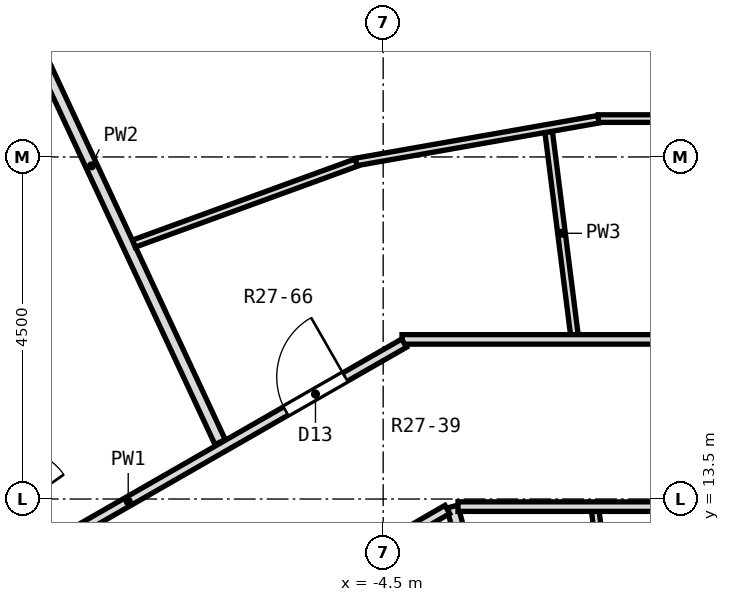
"""IFC4 building model, lengths in metres.
Left out: names, types, materials, properties, quantities, classifications, styles, units other than length and angle.
Written with IfcOpenShell. Run it as: python <this file> out.ifc"""

import sys

from ifc_helpers import new_model, si_unit, direction, frame, frame_2d, origin, place, context, subcontext, project, spatial, rectangle, extrude, element, fill, save


model = new_model("IFC4")
c1 = context("Model", 3, precision=1e-05, world=origin(), true_north=direction((0.0, 1.0)))
c2 = subcontext(c1, "Body", "Model", "MODEL_VIEW")
j1 = project(units=[si_unit("LENGTHUNIT", "METRE"), si_unit("PLANEANGLEUNIT", "RADIAN")], contexts=[c1])
p1 = place(None, origin())
s1 = spatial("IfcSite", under=j1, at=p1, CompositionType="ELEMENT")
p2 = place(p1, origin())
s2 = spatial("IfcBuilding", under=s1, at=p2, CompositionType="ELEMENT")
p3 = place(p2, frame((0.0, 0.0, 180.6)))
s3 = spatial("IfcBuildingStorey", under=s2, at=p3, CompositionType="ELEMENT", Elevation=180.6)
p4 = place(p3, frame((-2.323, 18.33, 0.0), z_axis=(0.0, 0.0, 1.0), x_axis=(0.125632208846, -0.992076886184, 0.0)))
e1 = element("IfcWall", 1, at=p4, inside=s3, PredefinedType="PARTITIONING", context=c2, shape_type="SweptSolid", body=[
    extrude(rectangle(XDim=2.689, YDim=0.1, at=frame_2d((1.345, 0.0))), origin(), (0.0, 0.0, 1.0), 2.85),
])
p5 = place(p3, frame((-1.709, 13.338, 0.0), z_axis=(0.0, 0.0, 1.0), x_axis=(0.126956267131, -0.991908315439, 0.0)))
e2 = element("IfcWall", 2, at=p5, inside=s3, PredefinedType="PARTITIONING", context=c2, shape_type="SweptSolid", body=[
    extrude(rectangle(XDim=1.954, YDim=0.1, at=frame_2d((0.977, 0.0))), origin(), (0.0, 0.0, 1.0), 2.85),
])
p6 = place(p5, frame((0.546, 0.0, 0.0)))
e3 = element("IfcOpeningElement", 3, at=p6, cuts=e2, PredefinedType="OPENING", context=c2, shape_type="SweptSolid", body=[
    extrude(rectangle(XDim=0.8, YDim=2.1, at=frame_2d((0.4, 1.05))), frame((0.0, 0.062, 0.0), z_axis=(0.0, -1.0, 0.0), x_axis=(1.0, 0.0, 0.0)), (0.0, 0.0, 1.0), 0.124),
])
p7 = place(p3, frame((-3.591, 13.4, 0.0), z_axis=(0.0, 0.0, 1.0), x_axis=(0.25888001656, -0.965909486974, 0.0)))
e4 = element("IfcWall", 4, at=p7, inside=s3, PredefinedType="PARTITIONING", context=c2, shape_type="SweptSolid", body=[
    extrude(rectangle(XDim=4.381, YDim=0.15, at=frame_2d((2.19, 0.0))), origin(), (0.0, 0.0, 1.0), 2.85),
])
p8 = place(p3, frame((-10.031, 21.517, 0.0), z_axis=(0.0, 0.0, 1.0), x_axis=(0.422305280768, -0.906453666679, 0.0)))
e5 = element("IfcWall", 5, at=p8, inside=s3, PredefinedType="PARTITIONING", context=c2, shape_type="SweptSolid", body=[
    extrude(rectangle(XDim=8.018, YDim=0.15, at=frame_2d((4.009, 0.0))), origin(), (0.0, 0.0, 1.0), 2.85),
])
p9 = place(p3, frame((-3.516, 13.4, 0.0), z_axis=(0.0, 0.0, 1.0), x_axis=(1.0, 0.0, 0.0)))
e6 = element("IfcWall", 6, at=p9, inside=s3, PredefinedType="PARTITIONING", context=c2, shape_type="SweptSolid", body=[
    extrude(rectangle(XDim=7.045, YDim=0.125, at=frame_2d((3.522, 0.0))), origin(), (0.0, 0.0, 1.0), 2.85),
])
p10 = place(p9, frame((3.067, 0.0, 0.0)))
e7 = element("IfcOpeningElement", 7, at=p10, cuts=e6, PredefinedType="OPENING", context=c2, shape_type="SweptSolid", body=[
    extrude(rectangle(XDim=1.0, YDim=2.1, at=frame_2d((0.5, 1.05))), frame((0.0, 0.074, 0.0), z_axis=(0.0, -1.0, 0.0), x_axis=(1.0, 0.0, 0.0)), (0.0, 0.0, 1.0), 0.149),
])
p11 = place(p3, frame((-4.252, 15.6, 0.0), z_axis=(0.0, 0.0, 1.0), x_axis=(1.0, 0.0, 0.0)))
e8 = element("IfcWall", 8, at=p11, inside=s3, PredefinedType="PARTITIONING", context=c2, shape_type="SweptSolid", body=[
    extrude(rectangle(XDim=8.369, YDim=0.125, at=frame_2d((4.185, 0.0))), origin(), (0.0, 0.0, 1.0), 2.85),
])
p12 = place(p11, frame((6.578, 0.0, 0.0)))
e9 = element("IfcOpeningElement", 9, at=p12, cuts=e8, PredefinedType="OPENING", context=c2, shape_type="SweptSolid", body=[
    extrude(rectangle(XDim=1.0, YDim=2.1, at=frame_2d((0.5, 1.05))), frame((0.0, 0.074, 0.0), z_axis=(0.0, -1.0, 0.0), x_axis=(1.0, 0.0, 0.0)), (0.0, 0.0, 1.0), 0.149),
])
p13 = place(p11, frame((3.55, 0.0, 0.0)))
e10 = element("IfcOpeningElement", 10, at=p13, cuts=e8, PredefinedType="OPENING", context=c2, shape_type="SweptSolid", body=[
    extrude(rectangle(XDim=0.9, YDim=2.1, at=frame_2d((0.45, 1.05))), frame((0.0, 0.074, 0.0), z_axis=(0.0, -1.0, 0.0), x_axis=(1.0, 0.0, 0.0)), (0.0, 0.0, 1.0), 0.149),
])
p14 = place(p3, frame((-1.67, 18.505, 0.0), z_axis=(0.0, 0.0, 1.0), x_axis=(1.0, 0.0, 0.0)))
e11 = element("IfcWall", 11, at=p14, inside=s3, PredefinedType="PARTITIONING", context=c2, shape_type="SweptSolid", body=[
    extrude(rectangle(XDim=3.289, YDim=0.1, at=frame_2d((1.644, 0.0))), origin(), (0.0, 0.0, 1.0), 2.85),
])
p15 = place(p3, frame((-4.858, 17.934, 0.0), z_axis=(0.0, 0.0, 1.0), x_axis=(0.984816929669, 0.173596126217, 0.0)))
e12 = element("IfcWall", 12, at=p15, inside=s3, PredefinedType="PARTITIONING", context=c2, shape_type="SweptSolid", body=[
    extrude(rectangle(XDim=3.239, YDim=0.1, at=frame_2d((1.619, 0.0))), origin(), (0.0, 0.0, 1.0), 2.85),
])
p16 = place(p3, frame((-7.78, 16.861, 0.0), z_axis=(0.0, 0.0, 1.0), x_axis=(0.939616954474, 0.3422279633, 0.0)))
e13 = element("IfcWall", 13, at=p16, inside=s3, PredefinedType="PARTITIONING", context=c2, shape_type="SweptSolid", body=[
    extrude(rectangle(XDim=3.113, YDim=0.1, at=frame_2d((1.556, 0.0))), origin(), (0.0, 0.0, 1.0), 2.85),
])
p17 = place(p3, frame((-11.484, 11.385, 0.0), z_axis=(0.0, 0.0, 1.0), x_axis=(0.867331679026, 0.49773060842, 0.0)))
e14 = element("IfcWall", 14, at=p17, inside=s3, PredefinedType="PARTITIONING", context=c2, shape_type="SweptSolid", body=[
    extrude(rectangle(XDim=8.371, YDim=0.125, at=frame_2d((4.185, 0.0))), origin(), (0.0, 0.0, 1.0), 2.85),
])
p18 = place(p17, frame((6.575, 0.0, 0.0)))
e15 = element("IfcOpeningElement", 15, at=p18, cuts=e14, PredefinedType="OPENING", context=c2, shape_type="SweptSolid", body=[
    extrude(rectangle(XDim=0.9, YDim=2.1, at=frame_2d((0.45, 1.05))), frame((0.0, 0.074, 0.0), z_axis=(0.0, -1.0, 0.0), x_axis=(1.0, 0.0, 0.0)), (0.0, 0.0, 1.0), 0.149),
])
p19 = place(p3, frame((-9.871, 9.773, 0.0), z_axis=(0.0, 0.0, 1.0), x_axis=(0.865954448031, 0.500122878836, 0.0)))
e16 = element("IfcWall", 16, at=p19, inside=s3, PredefinedType="PARTITIONING", context=c2, shape_type="SweptSolid", body=[
    extrude(rectangle(XDim=7.177, YDim=0.125, at=frame_2d((3.589, 0.0))), origin(), (0.0, 0.0, 1.0), 2.85),
])
p20 = place(p19, frame((3.112, 0.0, 0.0)))
e17 = element("IfcOpeningElement", 17, at=p20, cuts=e16, PredefinedType="OPENING", context=c2, shape_type="SweptSolid", body=[
    extrude(rectangle(XDim=1.0, YDim=2.1, at=frame_2d((0.5, 1.05))), frame((0.0, 0.074, 0.0), z_axis=(0.0, -1.0, 0.0), x_axis=(1.0, 0.0, 0.0)), (0.0, 0.0, 1.0), 0.149),
])
p21 = place(p18, origin())
e18 = element("IfcDoor", 18, at=p21, inside=s3, OperationType="SINGLE_SWING_RIGHT", PredefinedType="DOOR", context=c2, shape_type="SweptSolid", body=[
    extrude(rectangle(XDim=0.9, YDim=2.1, at=frame_2d((0.45, 1.05))), frame((0.0, 0.025, 0.0), z_axis=(0.0, -1.0, 0.0), x_axis=(1.0, 0.0, 0.0)), (0.0, 0.0, 1.0), 0.05),
])
fill(e15, e18)
save(model, sys.argv[1])
